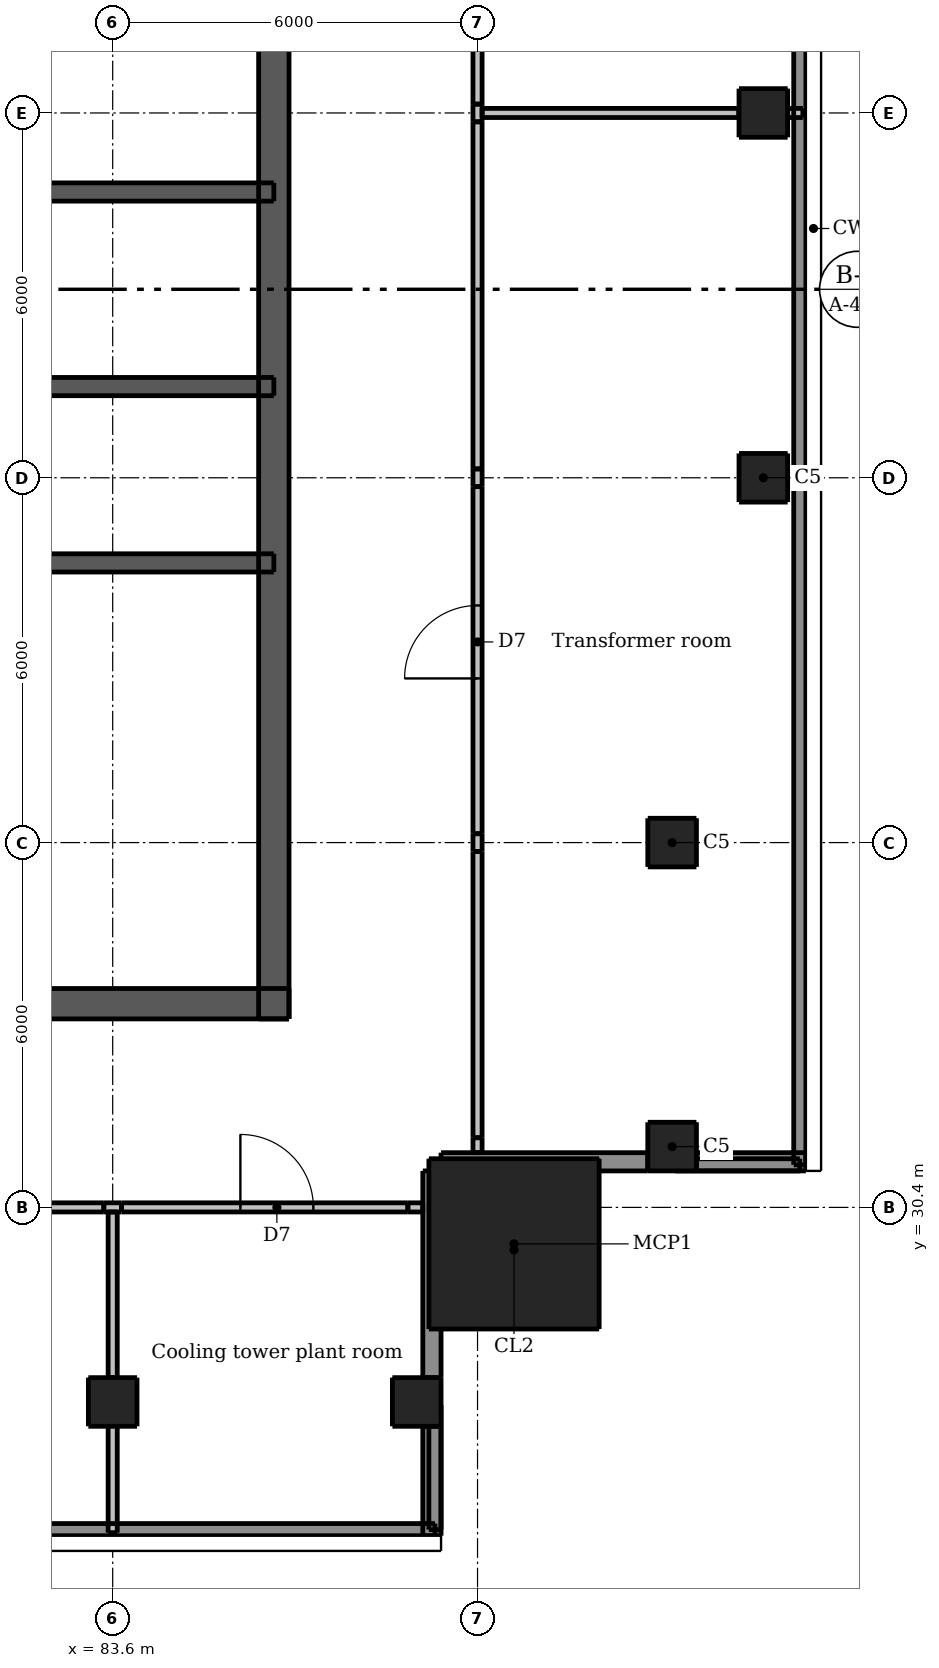
"""IFC4 building model, lengths in metres.
Left out: names, types, materials, properties, quantities, classifications, styles, units other than length and angle.
Written with IfcOpenShell. Run it as: python <this file> out.ifc"""

import sys

from ifc_helpers import new_model, si_unit, direction, frame, frame_2d, origin, origin_2d, place, context, subcontext, project, spatial, rectangle, extrude, element, fill, save


model = new_model("IFC4")
c1 = context("Model", 3, precision=1e-05, world=origin(), true_north=direction((0.0, 1.0)))
c2 = subcontext(c1, "Body", "Model", "MODEL_VIEW")
j1 = project(units=[si_unit("LENGTHUNIT", "METRE"), si_unit("PLANEANGLEUNIT", "RADIAN")], contexts=[c1])
p1 = place(None, origin())
s1 = spatial("IfcSite", under=j1, at=p1, CompositionType="ELEMENT")
p2 = place(p1, origin())
s2 = spatial("IfcBuilding", under=s1, at=p2, CompositionType="ELEMENT")
p3 = place(p2, frame((0.0, 0.0, 286.3)))
s3 = spatial("IfcBuildingStorey", under=s2, at=p3, CompositionType="ELEMENT", Elevation=286.3)
p4 = place(p3, frame((62.5, 33.75, 0.0), z_axis=(0.0, 0.0, 1.0), x_axis=(1.0, 0.0, 0.0)))
e1 = element("IfcWall", 1, at=p4, inside=s3, PredefinedType="SHEAR", context=c2, shape_type="SweptSolid", body=[
    extrude(rectangle(XDim=24.0, YDim=0.5, at=frame_2d((12.0, 0.0))), origin(), (0.0, 0.0, 1.0), 4.2),
])
p5 = place(p4, frame((1.875, 0.0, 0.0)))
e2 = element("IfcOpeningElement", 2, at=p5, cuts=e1, PredefinedType="OPENING", context=c2, shape_type="SweptSolid", body=[
    extrude(rectangle(XDim=1.1, YDim=2.1, at=frame_2d((0.55, 1.05))), frame((0.0, 0.26, 0.0), z_axis=(0.0, -1.0, 0.0), x_axis=(1.0, 0.0, 0.0)), (0.0, 0.0, 1.0), 0.52),
])
p6 = place(p4, frame((21.025, 0.0, 0.0)))
e3 = element("IfcOpeningElement", 3, at=p6, cuts=e1, PredefinedType="OPENING", context=c2, shape_type="SweptSolid", body=[
    extrude(rectangle(XDim=1.1, YDim=2.1, at=frame_2d((0.55, 1.05))), frame((0.0, 0.26, 0.0), z_axis=(0.0, -1.0, 0.0), x_axis=(1.0, 0.0, 0.0)), (0.0, 0.0, 1.0), 0.52),
])
p7 = place(p4, frame((8.0, 0.0, 0.0)))
e4 = element("IfcOpeningElement", 4, at=p7, cuts=e1, PredefinedType="OPENING", context=c2, shape_type="SweptSolid", body=[
    extrude(rectangle(XDim=1.1, YDim=2.1, at=frame_2d((0.55, 1.05))), frame((0.0, 0.26, 0.0), z_axis=(0.0, -1.0, 0.0), x_axis=(1.0, 0.0, 0.0)), (0.0, 0.0, 1.0), 0.52),
])
p8 = place(p4, frame((15.3, 0.0, 0.0)))
e5 = element("IfcOpeningElement", 5, at=p8, cuts=e1, PredefinedType="OPENING", context=c2, shape_type="SweptSolid", body=[
    extrude(rectangle(XDim=0.9, YDim=2.1, at=frame_2d((0.45, 1.05))), frame((0.0, 0.26, 0.0), z_axis=(0.0, -1.0, 0.0), x_axis=(1.0, 0.0, 0.0)), (0.0, 0.0, 1.0), 0.52),
])
p9 = place(p3, frame((86.25, 33.5, 0.0), z_axis=(0.0, 0.0, 1.0), x_axis=(0.0, 1.0, 0.0)))
e6 = element("IfcWall", 6, at=p9, inside=s3, PredefinedType="SHEAR", context=c2, shape_type="SweptSolid", body=[
    extrude(rectangle(XDim=24.0, YDim=0.5, at=frame_2d((12.0, 0.0))), origin(), (0.0, 0.0, 1.0), 4.2),
])
p10 = place(p9, frame((11.2, 0.0, 0.0)))
e7 = element("IfcOpeningElement", 7, at=p10, cuts=e6, PredefinedType="OPENING", context=c2, shape_type="SweptSolid", body=[
    extrude(rectangle(XDim=1.6, YDim=2.1, at=frame_2d((0.8, 1.05))), frame((0.0, 0.26, 0.0), z_axis=(0.0, -1.0, 0.0), x_axis=(1.0, 0.0, 0.0)), (0.0, 0.0, 1.0), 0.52),
])
p11 = place(p3, frame((62.75, 41.0, 0.0), z_axis=(0.0, 0.0, 1.0), x_axis=(1.0, 0.0, 0.0)))
e8 = element("IfcWall", 8, at=p11, inside=s3, PredefinedType="SHEAR", context=c2, shape_type="SweptSolid", body=[
    extrude(rectangle(XDim=23.5, YDim=0.3, at=frame_2d((11.75, 0.0))), origin(), (0.0, 0.0, 1.0), 4.2),
])
p12 = place(p3, frame((62.75, 43.9, 0.0), z_axis=(0.0, 0.0, 1.0), x_axis=(1.0, 0.0, 0.0)))
e9 = element("IfcWall", 9, at=p12, inside=s3, PredefinedType="SHEAR", context=c2, shape_type="SweptSolid", body=[
    extrude(rectangle(XDim=23.5, YDim=0.3, at=frame_2d((11.75, 0.0))), origin(), (0.0, 0.0, 1.0), 4.2),
])
p13 = place(p12, frame((1.032, 0.0, 0.0)))
e10 = element("IfcOpeningElement", 10, at=p13, cuts=e9, PredefinedType="OPENING", context=c2, shape_type="SweptSolid", body=[
    extrude(rectangle(XDim=0.9, YDim=2.1, at=frame_2d((0.45, 1.05))), frame((0.0, 0.16, 0.0), z_axis=(0.0, -1.0, 0.0), x_axis=(1.0, 0.0, 0.0)), (0.0, 0.0, 1.0), 0.32),
])
p14 = place(p12, frame((3.007, 0.0, 0.0)))
e11 = element("IfcOpeningElement", 11, at=p14, cuts=e9, PredefinedType="OPENING", context=c2, shape_type="SweptSolid", body=[
    extrude(rectangle(XDim=0.8, YDim=2.1, at=frame_2d((0.4, 1.05))), frame((0.0, 0.16, 0.0), z_axis=(0.0, -1.0, 0.0), x_axis=(1.0, 0.0, 0.0)), (0.0, 0.0, 1.0), 0.32),
])
p15 = place(p12, frame((20.875, 0.0, 0.0)))
e12 = element("IfcOpeningElement", 12, at=p15, cuts=e9, PredefinedType="OPENING", context=c2, shape_type="SweptSolid", body=[
    extrude(rectangle(XDim=0.9, YDim=2.1, at=frame_2d((0.45, 1.05))), frame((0.0, 0.16, 0.0), z_axis=(0.0, -1.0, 0.0), x_axis=(1.0, 0.0, 0.0)), (0.0, 0.0, 1.0), 0.32),
])
p16 = place(p12, frame((5.05, 0.0, 0.0)))
e13 = element("IfcOpeningElement", 13, at=p16, cuts=e9, PredefinedType="OPENING", context=c2, shape_type="SweptSolid", body=[
    extrude(rectangle(XDim=0.9, YDim=2.1, at=frame_2d((0.45, 1.05))), frame((0.0, 0.16, 0.0), z_axis=(0.0, -1.0, 0.0), x_axis=(1.0, 0.0, 0.0)), (0.0, 0.0, 1.0), 0.32),
])
p17 = place(p12, frame((7.55, 0.0, 0.0)))
e14 = element("IfcOpeningElement", 14, at=p17, cuts=e9, PredefinedType="OPENING", context=c2, shape_type="SweptSolid", body=[
    extrude(rectangle(XDim=0.9, YDim=2.1, at=frame_2d((0.45, 1.05))), frame((0.0, 0.16, 0.0), z_axis=(0.0, -1.0, 0.0), x_axis=(1.0, 0.0, 0.0)), (0.0, 0.0, 1.0), 0.32),
])
p18 = place(p12, frame((12.55, 0.0, 0.0)))
e15 = element("IfcOpeningElement", 15, at=p18, cuts=e9, PredefinedType="OPENING", context=c2, shape_type="SweptSolid", body=[
    extrude(rectangle(XDim=0.9, YDim=2.1, at=frame_2d((0.45, 1.05))), frame((0.0, 0.16, 0.0), z_axis=(0.0, -1.0, 0.0), x_axis=(1.0, 0.0, 0.0)), (0.0, 0.0, 1.0), 0.32),
])
p19 = place(p12, frame((15.05, 0.0, 0.0)))
e16 = element("IfcOpeningElement", 16, at=p19, cuts=e9, PredefinedType="OPENING", context=c2, shape_type="SweptSolid", body=[
    extrude(rectangle(XDim=0.9, YDim=2.1, at=frame_2d((0.45, 1.05))), frame((0.0, 0.16, 0.0), z_axis=(0.0, -1.0, 0.0), x_axis=(1.0, 0.0, 0.0)), (0.0, 0.0, 1.0), 0.32),
])
p20 = place(p3, frame((62.75, 47.1, 0.0), z_axis=(0.0, 0.0, 1.0), x_axis=(1.0, 0.0, 0.0)))
e17 = element("IfcWall", 17, at=p20, inside=s3, PredefinedType="SHEAR", context=c2, shape_type="SweptSolid", body=[
    extrude(rectangle(XDim=23.5, YDim=0.3, at=frame_2d((11.75, 0.0))), origin(), (0.0, 0.0, 1.0), 4.2),
])
p21 = place(p20, frame((1.725, 0.0, 0.0)))
e18 = element("IfcOpeningElement", 18, at=p21, cuts=e17, PredefinedType="OPENING", context=c2, shape_type="SweptSolid", body=[
    extrude(rectangle(XDim=0.9, YDim=2.1, at=frame_2d((0.45, 1.05))), frame((0.0, 0.16, 0.0), z_axis=(0.0, -1.0, 0.0), x_axis=(1.0, 0.0, 0.0)), (0.0, 0.0, 1.0), 0.32),
])
p22 = place(p20, frame((20.875, 0.0, 0.0)))
e19 = element("IfcOpeningElement", 19, at=p22, cuts=e17, PredefinedType="OPENING", context=c2, shape_type="SweptSolid", body=[
    extrude(rectangle(XDim=0.9, YDim=2.1, at=frame_2d((0.45, 1.05))), frame((0.0, 0.16, 0.0), z_axis=(0.0, -1.0, 0.0), x_axis=(1.0, 0.0, 0.0)), (0.0, 0.0, 1.0), 0.32),
])
p23 = place(p20, frame((7.55, 0.0, 0.0)))
e20 = element("IfcOpeningElement", 20, at=p23, cuts=e17, PredefinedType="OPENING", context=c2, shape_type="SweptSolid", body=[
    extrude(rectangle(XDim=0.9, YDim=2.1, at=frame_2d((0.45, 1.05))), frame((0.0, 0.16, 0.0), z_axis=(0.0, -1.0, 0.0), x_axis=(1.0, 0.0, 0.0)), (0.0, 0.0, 1.0), 0.32),
])
p24 = place(p20, frame((12.55, 0.0, 0.0)))
e21 = element("IfcOpeningElement", 21, at=p24, cuts=e17, PredefinedType="OPENING", context=c2, shape_type="SweptSolid", body=[
    extrude(rectangle(XDim=0.9, YDim=2.1, at=frame_2d((0.45, 1.05))), frame((0.0, 0.16, 0.0), z_axis=(0.0, -1.0, 0.0), x_axis=(1.0, 0.0, 0.0)), (0.0, 0.0, 1.0), 0.32),
])
p25 = place(p20, frame((17.55, 0.0, 0.0)))
e22 = element("IfcOpeningElement", 22, at=p25, cuts=e17, PredefinedType="OPENING", context=c2, shape_type="SweptSolid", body=[
    extrude(rectangle(XDim=0.9, YDim=2.1, at=frame_2d((0.45, 1.05))), frame((0.0, 0.16, 0.0), z_axis=(0.0, -1.0, 0.0), x_axis=(1.0, 0.0, 0.0)), (0.0, 0.0, 1.0), 0.32),
])
for number, where, z_axis, x_axis in (
    (23, (83.6, 27.2, 0.0), (0.0, 0.0, 1.0), (1.0, 0.0, 0.0)),
    (24, (88.6, 27.2, 0.0), (0.0, 0.0, 1.0), (1.0, 0.0, 0.0)),
    (25, (92.8, 31.4, 0.0), (0.0, 0.0, 1.0), (1.0, 0.0, 0.0)),
    (26, (92.8, 36.4, 0.0), (0.0, 0.0, 1.0), (1.0, 0.0, 0.0)),
    (27, (94.3, 42.4, 0.0), (0.0, 0.0, 1.0), (1.0, 0.0, 0.0)),
    (28, (94.3, 48.4, 0.0), (0.0, 0.0, 1.0), (1.0, 0.0, 0.0)),
):
    element("IfcColumn", number, at=place(p3, frame(where, z_axis=z_axis, x_axis=x_axis)), inside=s3, PredefinedType="COLUMN", context=c2, shape_type="SweptSolid", body=[
        extrude(rectangle(XDim=0.8, YDim=0.8, at=origin_2d()), origin(), (0.0, 0.0, 1.0), 4.2),
    ])
p26 = place(p3, frame((90.2, 29.8, 0.0), z_axis=(0.0, 0.0, 1.0), x_axis=(1.0, 0.0, 0.0)))
e29 = element("IfcColumn", 29, at=p26, inside=s3, PredefinedType="COLUMN", context=c2, shape_type="SweptSolid", body=[
    extrude(rectangle(XDim=2.8, YDim=2.8, at=origin_2d()), origin(), (0.0, 0.0, 1.0), 4.5),
])
p27 = place(p3, frame((88.85, 25.0, 0.0), z_axis=(0.0, 0.0, 1.0), x_axis=(0.0, 1.0, 0.0)))
e30 = element("IfcWall", 30, at=p27, inside=s3, PredefinedType="SOLIDWALL", context=c2, shape_type="SweptSolid", body=[
    extrude(rectangle(XDim=1.8, YDim=0.3, at=frame_2d((0.9, 0.0))), origin(), (0.0, 0.0, 1.0), 4.2),
])
for number, where, z_axis, x_axis in (
    (31, (88.85, 27.6, 0.0), (0.0, 0.0, 1.0), (0.0, 1.0, 0.0)),
    (32, (89.0, 31.15, 0.0), (0.0, 0.0, 1.0), (1.0, 0.0, 0.0)),
):
    element("IfcWall", number, at=place(p3, frame(where, z_axis=z_axis, x_axis=x_axis)), inside=s3, PredefinedType="SOLIDWALL", context=c2, shape_type="SweptSolid", body=[
        extrude(rectangle(XDim=3.4, YDim=0.3, at=frame_2d((1.7, 0.0))), origin(), (0.0, 0.0, 1.0), 4.2),
    ])
p28 = place(p3, frame((93.2, 31.15, 0.0), z_axis=(0.0, 0.0, 1.0), x_axis=(1.0, 0.0, 0.0)))
e33 = element("IfcWall", 33, at=p28, inside=s3, PredefinedType="SOLIDWALL", context=c2, shape_type="SweptSolid", body=[
    extrude(rectangle(XDim=1.8, YDim=0.3, at=frame_2d((0.9, 0.0))), origin(), (0.0, 0.0, 1.0), 4.2),
])
for number, where, z_axis, x_axis in (
    (34, (94.9, 31.1, 4.5), (0.0, 0.0, 1.0), (-1.0, 0.0, 0.0)),
    (35, (88.9, 27.15, 4.5), (0.0, 0.0, 1.0), (0.0, -1.0, 0.0)),
):
    element("IfcWall", number, at=place(p3, frame(where, z_axis=z_axis, x_axis=x_axis)), inside=s3, PredefinedType="PARAPET", context=c2, shape_type="SweptSolid", body=[
        extrude(rectangle(XDim=2.05, YDim=0.2, at=frame_2d((1.025, 0.0))), origin(), (0.0, 0.0, 1.0), 1.1),
    ])
for number, where, z_axis, x_axis in (
    (36, (88.9, 25.1, 4.5), (0.0, 0.0, 1.0), (-1.0, 0.0, 0.0)),
    (37, (94.9, 61.9, 4.5), (0.0, 0.0, 1.0), (0.0, -1.0, 0.0)),
):
    element("IfcWall", number, at=place(p3, frame(where, z_axis=z_axis, x_axis=x_axis)), inside=s3, PredefinedType="PARAPET", context=c2, shape_type="SweptSolid", body=[
        extrude(rectangle(XDim=30.8, YDim=0.2, at=frame_2d((15.4, 0.0))), origin(), (0.0, 0.0, 1.0), 1.1),
    ])
p29 = place(p3, frame((77.746, 30.4, 0.0), z_axis=(0.0, 0.0, 1.0), x_axis=(1.0, 0.0, 0.0)))
e38 = element("IfcWall", 38, at=p29, inside=s3, PredefinedType="PARTITIONING", context=c2, shape_type="SweptSolid", body=[
    extrude(rectangle(XDim=5.708, YDim=0.15, at=frame_2d((2.854, 0.0))), origin(), (0.0, 0.0, 1.0), 4.2),
])
p30 = place(p29, frame((0.004, 0.0, 0.0)))
e39 = element("IfcOpeningElement", 39, at=p30, cuts=e38, PredefinedType="OPENING", context=c2, shape_type="SweptSolid", body=[
    extrude(rectangle(XDim=1.2, YDim=2.1, at=frame_2d((0.6, 1.05))), frame((0.0, 0.085, 0.0), z_axis=(0.0, -1.0, 0.0), x_axis=(1.0, 0.0, 0.0)), (0.0, 0.0, 1.0), 0.17),
])
p31 = place(p3, frame((83.454, 30.4, 0.0), z_axis=(0.0, 0.0, 1.0), x_axis=(1.0, 0.0, 0.0)))
e40 = element("IfcWall", 40, at=p31, inside=s3, PredefinedType="PARTITIONING", context=c2, shape_type="SweptSolid", body=[
    extrude(rectangle(XDim=0.292, YDim=0.15, at=frame_2d((0.146, 0.0))), origin(), (0.0, 0.0, 1.0), 3.365),
])
p32 = place(p3, frame((83.746, 30.4, 0.0), z_axis=(0.0, 0.0, 1.0), x_axis=(1.0, 0.0, 0.0)))
e41 = element("IfcWall", 41, at=p32, inside=s3, PredefinedType="PARTITIONING", context=c2, shape_type="SweptSolid", body=[
    extrude(rectangle(XDim=4.708, YDim=0.15, at=frame_2d((2.354, 0.0))), origin(), (0.0, 0.0, 1.0), 4.2),
])
p33 = place(p32, frame((1.954, 0.0, 0.0)))
e42 = element("IfcOpeningElement", 42, at=p33, cuts=e41, PredefinedType="OPENING", context=c2, shape_type="SweptSolid", body=[
    extrude(rectangle(XDim=1.2, YDim=2.1, at=frame_2d((0.6, 1.05))), frame((0.0, 0.085, 0.0), z_axis=(0.0, -1.0, 0.0), x_axis=(1.0, 0.0, 0.0)), (0.0, 0.0, 1.0), 0.17),
])
p34 = place(p3, frame((88.454, 30.4, 0.0), z_axis=(0.0, 0.0, 1.0), x_axis=(1.0, 0.0, 0.0)))
e43 = element("IfcWall", 43, at=p34, inside=s3, PredefinedType="PARTITIONING", context=c2, shape_type="SweptSolid", body=[
    extrude(rectangle(XDim=0.246, YDim=0.15, at=frame_2d((0.123, 0.0))), origin(), (0.0, 0.0, 1.0), 3.362),
])
p35 = place(p3, frame((89.675, 48.4, 0.0), z_axis=(0.0, 0.0, 1.0), x_axis=(1.0, 0.0, 0.0)))
e44 = element("IfcWall", 44, at=p35, inside=s3, PredefinedType="PARTITIONING", context=c2, shape_type="SweptSolid", body=[
    extrude(rectangle(XDim=4.225, YDim=0.15, at=frame_2d((2.112, 0.0))), origin(), (0.0, 0.0, 1.0), 3.365),
])
p36 = place(p3, frame((93.9, 48.4, 0.0), z_axis=(0.0, 0.0, 1.0), x_axis=(1.0, 0.0, 0.0)))
e45 = element("IfcWall", 45, at=p36, inside=s3, PredefinedType="PARTITIONING", context=c2, shape_type="SweptSolid", body=[
    extrude(rectangle(XDim=1.05, YDim=0.15, at=frame_2d((0.525, 0.0))), origin(), (0.0, 0.0, 1.0), 4.2),
])
p37 = place(p3, frame((83.6, 25.05, 0.0), z_axis=(0.0, 0.0, 1.0), x_axis=(0.0, 1.0, 0.0)))
e46 = element("IfcWall", 46, at=p37, inside=s3, PredefinedType="PARTITIONING", context=c2, shape_type="SweptSolid", body=[
    extrude(rectangle(XDim=2.55, YDim=0.15, at=frame_2d((1.275, 0.0))), origin(), (0.0, 0.0, 1.0), 4.2),
])
p38 = place(p3, frame((83.6, 27.6, 0.0), z_axis=(0.0, 0.0, 1.0), x_axis=(0.0, 1.0, 0.0)))
e47 = element("IfcWall", 47, at=p38, inside=s3, PredefinedType="PARTITIONING", context=c2, shape_type="SweptSolid", body=[
    extrude(rectangle(XDim=2.725, YDim=0.15, at=frame_2d((1.362, 0.0))), origin(), (0.0, 0.0, 1.0), 3.365),
])
p39 = place(p3, frame((89.6, 31.3, 0.0), z_axis=(0.0, 0.0, 1.0), x_axis=(0.0, 1.0, 0.0)))
e48 = element("IfcWall", 48, at=p39, inside=s3, PredefinedType="PARTITIONING", context=c2, shape_type="SweptSolid", body=[
    extrude(rectangle(XDim=0.246, YDim=0.15, at=frame_2d((0.123, 0.0))), origin(), (0.0, 0.0, 1.0), 3.365),
])
p40 = place(p3, frame((89.6, 31.546, 0.0), z_axis=(0.0, 0.0, 1.0), x_axis=(0.0, 1.0, 0.0)))
e49 = element("IfcWall", 49, at=p40, inside=s3, PredefinedType="PARTITIONING", context=c2, shape_type="SweptSolid", body=[
    extrude(rectangle(XDim=4.708, YDim=0.15, at=frame_2d((2.354, 0.0))), origin(), (0.0, 0.0, 1.0), 4.2),
])
p41 = place(p3, frame((89.6, 36.254, 0.0), z_axis=(0.0, 0.0, 1.0), x_axis=(0.0, 1.0, 0.0)))
e50 = element("IfcWall", 50, at=p41, inside=s3, PredefinedType="PARTITIONING", context=c2, shape_type="SweptSolid", body=[
    extrude(rectangle(XDim=0.292, YDim=0.15, at=frame_2d((0.146, 0.0))), origin(), (0.0, 0.0, 1.0), 3.359),
])
p42 = place(p3, frame((89.6, 36.546, 0.0), z_axis=(0.0, 0.0, 1.0), x_axis=(0.0, 1.0, 0.0)))
e51 = element("IfcWall", 51, at=p42, inside=s3, PredefinedType="PARTITIONING", context=c2, shape_type="SweptSolid", body=[
    extrude(rectangle(XDim=5.708, YDim=0.15, at=frame_2d((2.854, 0.0))), origin(), (0.0, 0.0, 1.0), 4.2),
])
p43 = place(p42, frame((2.554, 0.0, 0.0)))
e52 = element("IfcOpeningElement", 52, at=p43, cuts=e51, PredefinedType="OPENING", context=c2, shape_type="SweptSolid", body=[
    extrude(rectangle(XDim=1.2, YDim=2.1, at=frame_2d((0.6, 1.05))), frame((0.0, 0.085, 0.0), z_axis=(0.0, -1.0, 0.0), x_axis=(1.0, 0.0, 0.0)), (0.0, 0.0, 1.0), 0.17),
])
p44 = place(p3, frame((89.6, 42.254, 0.0), z_axis=(0.0, 0.0, 1.0), x_axis=(0.0, 1.0, 0.0)))
e53 = element("IfcWall", 53, at=p44, inside=s3, PredefinedType="PARTITIONING", context=c2, shape_type="SweptSolid", body=[
    extrude(rectangle(XDim=0.292, YDim=0.15, at=frame_2d((0.146, 0.0))), origin(), (0.0, 0.0, 1.0), 3.365),
])
p45 = place(p3, frame((89.6, 42.546, 0.0), z_axis=(0.0, 0.0, 1.0), x_axis=(0.0, 1.0, 0.0)))
e54 = element("IfcWall", 54, at=p45, inside=s3, PredefinedType="PARTITIONING", context=c2, shape_type="SweptSolid", body=[
    extrude(rectangle(XDim=5.708, YDim=0.15, at=frame_2d((2.854, 0.0))), origin(), (0.0, 0.0, 1.0), 4.2),
])
p46 = place(p3, frame((89.6, 48.254, 0.0), z_axis=(0.0, 0.0, 1.0), x_axis=(0.0, 1.0, 0.0)))
e55 = element("IfcWall", 55, at=p46, inside=s3, PredefinedType="PARTITIONING", context=c2, shape_type="SweptSolid", body=[
    extrude(rectangle(XDim=0.292, YDim=0.15, at=frame_2d((0.146, 0.0))), origin(), (0.0, 0.0, 1.0), 3.365),
])
p47 = place(p3, frame((89.6, 48.546, 0.0), z_axis=(0.0, 0.0, 1.0), x_axis=(0.0, 1.0, 0.0)))
e56 = element("IfcWall", 56, at=p47, inside=s3, PredefinedType="PARTITIONING", context=c2, shape_type="SweptSolid", body=[
    extrude(rectangle(XDim=5.708, YDim=0.15, at=frame_2d((2.854, 0.0))), origin(), (0.0, 0.0, 1.0), 4.2),
])
p48 = place(p6, origin())
e57 = element("IfcDoor", 57, at=p48, inside=s3, OperationType="SINGLE_SWING_RIGHT", PredefinedType="DOOR", context=c2, shape_type="SweptSolid", body=[
    extrude(rectangle(XDim=1.1, YDim=2.1, at=frame_2d((0.55, 1.05))), frame((0.0, 0.237, 0.0), z_axis=(0.0, -1.0, 0.0), x_axis=(1.0, 0.0, 0.0)), (0.0, 0.0, 1.0), 0.05),
])
fill(e3, e57)
p49 = place(p10, origin())
e58 = element("IfcDoor", 58, at=p49, inside=s3, OperationType="DOUBLE_DOOR_SINGLE_SWING", PredefinedType="DOOR", context=c2, shape_type="SweptSolid", body=[
    extrude(rectangle(XDim=1.6, YDim=2.1, at=frame_2d((0.8, 1.05))), frame((0.0, 0.237, 0.0), z_axis=(0.0, -1.0, 0.0), x_axis=(1.0, 0.0, 0.0)), (0.0, 0.0, 1.0), 0.05),
])
fill(e7, e58)
p50 = place(p15, origin())
e59 = element("IfcDoor", 59, at=p50, inside=s3, OperationType="SINGLE_SWING_LEFT", PredefinedType="DOOR", context=c2, shape_type="SweptSolid", body=[
    extrude(rectangle(XDim=0.9, YDim=2.1, at=frame_2d((0.45, 1.05))), frame((0.0, -0.087, 0.0), z_axis=(0.0, -1.0, 0.0), x_axis=(1.0, 0.0, 0.0)), (0.0, 0.0, 1.0), 0.05),
])
fill(e12, e59)
p51 = place(p22, origin())
e60 = element("IfcDoor", 60, at=p51, inside=s3, OperationType="SINGLE_SWING_LEFT", PredefinedType="DOOR", context=c2, shape_type="SweptSolid", body=[
    extrude(rectangle(XDim=0.9, YDim=2.1, at=frame_2d((0.45, 1.05))), frame((0.0, 0.138, 0.0), z_axis=(0.0, -1.0, 0.0), x_axis=(1.0, 0.0, 0.0)), (0.0, 0.0, 1.0), 0.05),
])
fill(e19, e60)
p52 = place(p33, origin())
e61 = element("IfcDoor", 61, at=p52, inside=s3, OperationType="SINGLE_SWING_LEFT", PredefinedType="DOOR", context=c2, shape_type="SweptSolid", body=[
    extrude(rectangle(XDim=1.2, YDim=2.1, at=frame_2d((0.6, 1.05))), frame((0.0, 0.025, 0.0), z_axis=(0.0, -1.0, 0.0), x_axis=(1.0, 0.0, 0.0)), (0.0, 0.0, 1.0), 0.05),
])
fill(e42, e61)
p53 = place(p43, origin())
e62 = element("IfcDoor", 62, at=p53, inside=s3, OperationType="SINGLE_SWING_LEFT", PredefinedType="DOOR", context=c2, shape_type="SweptSolid", body=[
    extrude(rectangle(XDim=1.2, YDim=2.1, at=frame_2d((0.6, 1.05))), frame((0.0, 0.025, 0.0), z_axis=(0.0, -1.0, 0.0), x_axis=(1.0, 0.0, 0.0)), (0.0, 0.0, 1.0), 0.05),
])
fill(e52, e62)
save(model, sys.argv[1])
